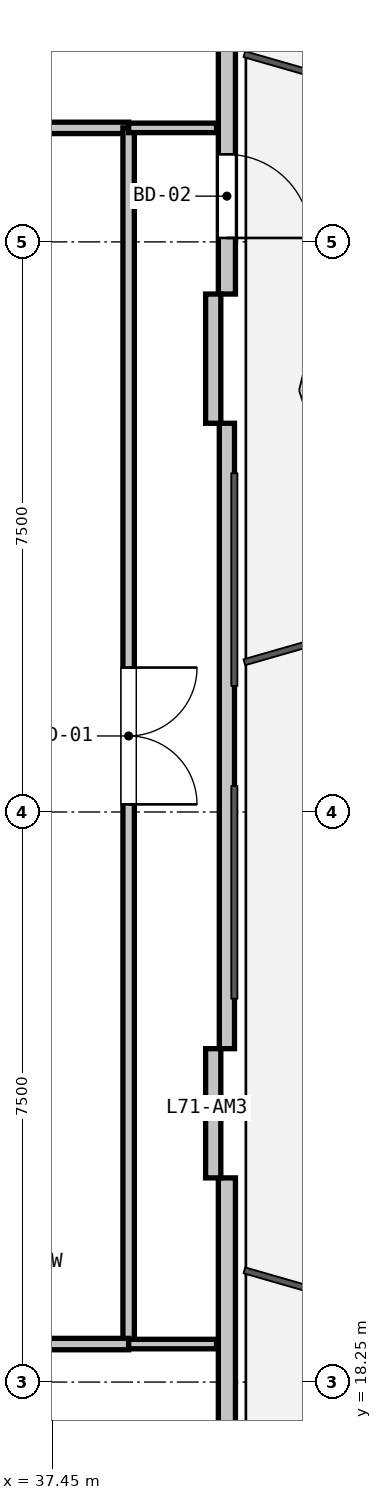
"""IFC4 building model, lengths in metres.
Left out: names, types, materials, properties, quantities, classifications, styles, units other than length and angle.
Written with IfcOpenShell. Run it as: python <this file> out.ifc"""

import sys

from ifc_helpers import new_model, si_unit, direction, frame, frame_2d, origin, place, context, subcontext, project, spatial, rectangle, extrude, element, fill, save


model = new_model("IFC4")
c1 = context("Model", 3, precision=1e-05, world=origin(), true_north=direction((0.0, 1.0)))
c2 = subcontext(c1, "Body", "Model", "MODEL_VIEW")
j1 = project(units=[si_unit("LENGTHUNIT", "METRE"), si_unit("PLANEANGLEUNIT", "RADIAN")], contexts=[c1])
p1 = place(None, origin())
s1 = spatial("IfcSite", under=j1, at=p1, CompositionType="ELEMENT")
p2 = place(p1, origin())
s2 = spatial("IfcBuilding", under=s1, at=p2, CompositionType="ELEMENT")
p3 = place(p2, frame((0.0, 0.0, 254.1)))
s3 = spatial("IfcBuildingStorey", under=s2, at=p3, CompositionType="ELEMENT", Elevation=254.1)
p4 = place(p3, frame((39.743, 41.492, 0.0), z_axis=(0.0, 0.0, 1.0), x_axis=(0.0, -1.0, 0.0)))
e1 = element("IfcWall", 1, at=p4, inside=s3, PredefinedType="SOLIDWALL", context=c2, shape_type="SweptSolid", body=[
    extrude(rectangle(XDim=8.928, YDim=0.225, at=frame_2d((4.464, 0.0))), origin(), (0.0, 0.0, 1.0), 3.8),
])
p5 = place(p4, frame((7.09, 0.0, 0.0)))
e2 = element("IfcOpeningElement", 2, at=p5, cuts=e1, PredefinedType="OPENING", context=c2, shape_type="SweptSolid", body=[
    extrude(rectangle(XDim=1.1, YDim=2.1, at=frame_2d((0.55, 1.05))), frame((0.0, 0.123, 0.0), z_axis=(0.0, -1.0, 0.0), x_axis=(1.0, 0.0, 0.0)), (0.0, 0.0, 1.0), 0.245),
])
p6 = place(p3, frame((39.743, 30.864, 0.0), z_axis=(0.0, 0.0, 1.0), x_axis=(0.0, -1.0, 0.0)))
e3 = element("IfcWall", 3, at=p6, inside=s3, PredefinedType="PARAPET", context=c2, shape_type="SweptSolid", body=[
    extrude(rectangle(XDim=8.228, YDim=0.2, at=frame_2d((4.114, 0.0))), origin(), (0.0, 0.0, 1.0), 0.2),
])
p7 = place(p3, frame((39.743, 20.936, 0.0), z_axis=(0.0, 0.0, 1.0), x_axis=(0.0, -1.0, 0.0)))
e4 = element("IfcWall", 4, at=p7, inside=s3, PredefinedType="SOLIDWALL", context=c2, shape_type="SweptSolid", body=[
    extrude(rectangle(XDim=8.928, YDim=0.225, at=frame_2d((4.464, 0.0))), origin(), (0.0, 0.0, 1.0), 3.8),
])
p8 = place(p7, frame((6.262, 0.0, 0.9)))
e5 = element("IfcOpeningElement", 5, at=p8, cuts=e4, PredefinedType="OPENING", context=c2, shape_type="SweptSolid", body=[
    extrude(rectangle(XDim=0.9, YDim=1.4, at=frame_2d((0.45, 0.7))), frame((0.0, 0.123, 0.0), z_axis=(0.0, -1.0, 0.0), x_axis=(1.0, 0.0, 0.0)), (0.0, 0.0, 1.0), 0.245),
])
for number, where, z_axis, x_axis in (
    (6, (39.563, 32.564, 0.0), (0.0, 0.0, 1.0), (0.0, -1.0, 0.0)),
    (7, (39.563, 22.636, 0.0), (0.0, 0.0, 1.0), (0.0, -1.0, 0.0)),
):
    element("IfcWall", number, at=place(p3, frame(where, z_axis=z_axis, x_axis=x_axis)), inside=s3, PredefinedType="PARAPET", context=c2, shape_type="SweptSolid", body=[
        extrude(rectangle(XDim=1.7, YDim=0.2, at=frame_2d((0.85, 0.0))), origin(), (0.0, 0.0, 1.0), 3.8),
    ])
p9 = place(p3, frame((33.0, 34.75, 0.0), z_axis=(0.0, 0.0, 1.0), x_axis=(1.0, 0.0, 0.0)))
e8 = element("IfcWall", 8, at=p9, inside=s3, PredefinedType="PARTITIONING", context=c2, shape_type="SweptSolid", body=[
    extrude(rectangle(XDim=5.45, YDim=0.15, at=frame_2d((2.725, 0.0))), origin(), (0.0, 0.0, 1.0), 3.628),
])
p10 = place(p9, frame((0.778, 0.0, 0.0)))
e9 = element("IfcOpeningElement", 9, at=p10, cuts=e8, PredefinedType="OPENING", context=c2, shape_type="SweptSolid", body=[
    extrude(rectangle(XDim=1.8, YDim=2.2, at=frame_2d((0.9, 1.1))), frame((0.0, 0.085, 0.0), z_axis=(0.0, -1.0, 0.0), x_axis=(1.0, 0.0, 0.0)), (0.0, 0.0, 1.0), 0.17),
])
p11 = place(p3, frame((38.45, 34.75, 0.0), z_axis=(0.0, 0.0, 1.0), x_axis=(0.0, -1.0, 0.0)))
e10 = element("IfcWall", 10, at=p11, inside=s3, PredefinedType="PARTITIONING", context=c2, shape_type="SweptSolid", body=[
    extrude(rectangle(XDim=16.0, YDim=0.15, at=frame_2d((8.0, 0.0))), origin(), (0.0, 0.0, 1.0), 4.18),
])
p12 = place(p11, frame((7.1, 0.0, 0.0)))
e11 = element("IfcOpeningElement", 11, at=p12, cuts=e10, PredefinedType="OPENING", context=c2, shape_type="SweptSolid", body=[
    extrude(rectangle(XDim=1.8, YDim=2.2, at=frame_2d((0.9, 1.1))), frame((0.0, 0.085, 0.0), z_axis=(0.0, -1.0, 0.0), x_axis=(1.0, 0.0, 0.0)), (0.0, 0.0, 1.0), 0.17),
])
p13 = place(p3, frame((38.45, 18.75, 0.0), z_axis=(0.0, 0.0, 1.0), x_axis=(-1.0, 0.0, 0.0)))
e12 = element("IfcWall", 12, at=p13, inside=s3, PredefinedType="PARTITIONING", context=c2, shape_type="SweptSolid", body=[
    extrude(rectangle(XDim=9.45, YDim=0.15, at=frame_2d((4.725, 0.0))), origin(), (0.0, 0.0, 1.0), 3.628),
])
p14 = place(p13, frame((4.225, 0.0, 0.0)))
e13 = element("IfcOpeningElement", 13, at=p14, cuts=e12, PredefinedType="OPENING", context=c2, shape_type="SweptSolid", body=[
    extrude(rectangle(XDim=1.0, YDim=2.15, at=frame_2d((0.5, 1.075))), frame((0.0, 0.085, 0.0), z_axis=(0.0, -1.0, 0.0), x_axis=(1.0, 0.0, 0.0)), (0.0, 0.0, 1.0), 0.17),
])
for number, where, z_axis, x_axis in (
    (14, (39.606, 34.75, 0.0), (0.0, 0.0, 1.0), (-1.0, 0.0, 0.0)),
    (15, (39.606, 18.75, 0.0), (0.0, 0.0, 1.0), (-1.0, 0.0, 0.0)),
):
    element("IfcWall", number, at=place(p3, frame(where, z_axis=z_axis, x_axis=x_axis)), inside=s3, PredefinedType="PARTITIONING", context=c2, shape_type="SweptSolid", body=[
        extrude(rectangle(XDim=1.156, YDim=0.125, at=frame_2d((0.578, 0.0))), origin(), (0.0, 0.0, 1.0), 2.365),
    ])
p15 = place(p5, origin())
e16 = element("IfcDoor", 16, at=p15, inside=s3, OperationType="SINGLE_SWING_RIGHT", PredefinedType="DOOR", context=c2, shape_type="SweptSolid", body=[
    extrude(rectangle(XDim=1.1, YDim=2.1, at=frame_2d((0.55, 1.05))), frame((0.0, 0.025, 0.0), z_axis=(0.0, -1.0, 0.0), x_axis=(1.0, 0.0, 0.0)), (0.0, 0.0, 1.0), 0.05),
])
fill(e2, e16)
p16 = place(p12, origin())
e17 = element("IfcDoor", 17, at=p16, inside=s3, OperationType="DOUBLE_DOOR_SINGLE_SWING", PredefinedType="DOOR", context=c2, shape_type="SweptSolid", body=[
    extrude(rectangle(XDim=1.8, YDim=2.2, at=frame_2d((0.9, 1.1))), frame((0.0, 0.025, 0.0), z_axis=(0.0, -1.0, 0.0), x_axis=(1.0, 0.0, 0.0)), (0.0, 0.0, 1.0), 0.05),
])
fill(e11, e17)
save(model, sys.argv[1])
